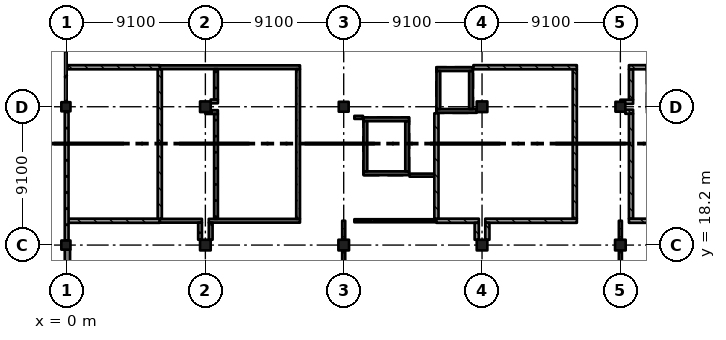
"""IFC4 building model, lengths in metres.
Left out: names, types, materials, properties, quantities, classifications, styles, units other than length and angle.
Written with IfcOpenShell. Run it as: python <this file> out.ifc"""

import sys

from ifc_helpers import new_model, si_unit, direction, frame, frame_2d, origin, origin_2d, place, context, subcontext, project, spatial, rectangle, extrude, element, fill, save


model = new_model("IFC4")
c1 = context("Model", 3, precision=1e-05, world=origin(), true_north=direction((0.0, 1.0)))
c2 = subcontext(c1, "Body", "Model", "MODEL_VIEW")
j1 = project(units=[si_unit("LENGTHUNIT", "METRE"), si_unit("PLANEANGLEUNIT", "RADIAN")], contexts=[c1])
p1 = place(None, origin())
s1 = spatial("IfcSite", under=j1, at=p1, CompositionType="ELEMENT")
p2 = place(p1, origin())
s2 = spatial("IfcBuilding", under=s1, at=p2, CompositionType="ELEMENT")
p3 = place(p2, frame((0.0, 0.0, 15.47)))
s3 = spatial("IfcBuildingStorey", under=s2, at=p3, CompositionType="ELEMENT", Elevation=15.47)
for number, where, z_axis, x_axis in (
    (1, (-0.075, 18.2, 0.0), (0.0, 0.0, 1.0), (1.0, 0.0, 0.0)),
    (2, (-0.075, 27.3, 0.0), (0.0, 0.0, 1.0), (1.0, 0.0, 0.0)),
):
    element("IfcColumn", number, at=place(p3, frame(where, z_axis=z_axis, x_axis=x_axis)), inside=s3, PredefinedType="COLUMN", context=c2, shape_type="SweptSolid", body=[
        extrude(rectangle(XDim=0.6, YDim=0.6, at=origin_2d()), origin(), (0.0, 0.0, 1.0), 4.55),
    ])
for number, where, z_axis, x_axis in (
    (3, (9.1, 18.2, 0.0), (0.0, 0.0, 1.0), (1.0, 0.0, 0.0)),
    (4, (9.1, 27.3, 0.0), (0.0, 0.0, 1.0), (1.0, 0.0, 0.0)),
    (5, (18.2, 18.2, 0.0), (0.0, 0.0, 1.0), (1.0, 0.0, 0.0)),
):
    element("IfcColumn", number, at=place(p3, frame(where, z_axis=z_axis, x_axis=x_axis)), inside=s3, PredefinedType="COLUMN", context=c2, shape_type="SweptSolid", body=[
        extrude(rectangle(XDim=0.7, YDim=0.7, at=origin_2d()), origin(), (0.0, 0.0, 1.0), 4.55),
    ])
p4 = place(p3, frame((18.2, 27.3, 0.0), z_axis=(0.0, 0.0, 1.0), x_axis=(1.0, 0.0, 0.0)))
e6 = element("IfcColumn", 6, at=p4, inside=s3, PredefinedType="COLUMN", context=c2, shape_type="SweptSolid", body=[
    extrude(rectangle(XDim=0.65, YDim=0.65, at=origin_2d()), origin(), (0.0, 0.0, 1.0), 4.55),
])
for number, where, z_axis, x_axis in (
    (7, (27.3, 18.2, 0.0), (0.0, 0.0, 1.0), (1.0, 0.0, 0.0)),
    (8, (27.3, 27.3, 0.0), (0.0, 0.0, 1.0), (1.0, 0.0, 0.0)),
    (9, (36.4, 18.2, 0.0), (0.0, 0.0, 1.0), (1.0, 0.0, 0.0)),
):
    element("IfcColumn", number, at=place(p3, frame(where, z_axis=z_axis, x_axis=x_axis)), inside=s3, PredefinedType="COLUMN", context=c2, shape_type="SweptSolid", body=[
        extrude(rectangle(XDim=0.7, YDim=0.7, at=origin_2d()), origin(), (0.0, 0.0, 1.0), 4.55),
    ])
p5 = place(p3, frame((36.4, 27.3, 0.0), z_axis=(0.0, 0.0, 1.0), x_axis=(1.0, 0.0, 0.0)))
e10 = element("IfcColumn", 10, at=p5, inside=s3, PredefinedType="COLUMN", context=c2, shape_type="SweptSolid", body=[
    extrude(rectangle(XDim=0.65, YDim=0.65, at=origin_2d()), origin(), (0.0, 0.0, 1.0), 4.55),
])
p6 = place(p3, frame((26.95, 27.025, 0.0), z_axis=(0.0, 0.0, 1.0), x_axis=(-1.0, 0.0, 0.0)))
e11 = element("IfcWall", 11, at=p6, inside=s3, PredefinedType="SHEAR", context=c2, shape_type="SweptSolid", body=[
    extrude(rectangle(XDim=2.65, YDim=0.25, at=frame_2d((1.325, 0.0))), origin(), (0.0, 0.0, 1.0), 4.55),
])
p7 = place(p3, frame((26.7, 29.775, 0.0), z_axis=(0.0, 0.0, 1.0), x_axis=(-1.0, 0.0, 0.0)))
e12 = element("IfcWall", 12, at=p7, inside=s3, PredefinedType="SHEAR", context=c2, shape_type="SweptSolid", body=[
    extrude(rectangle(XDim=2.4, YDim=0.25, at=frame_2d((1.2, 0.0))), origin(), (0.0, 0.0, 1.0), 4.55),
])
p8 = place(p3, frame((24.425, 29.65, 0.0), z_axis=(0.0, 0.0, 1.0), x_axis=(0.0, -1.0, 0.0)))
e13 = element("IfcWall", 13, at=p8, inside=s3, PredefinedType="SHEAR", context=c2, shape_type="SweptSolid", body=[
    extrude(rectangle(XDim=2.5, YDim=0.25, at=frame_2d((1.25, 0.0))), origin(), (0.0, 0.0, 1.0), 4.55),
])
p9 = place(p8, frame((0.9, 0.0, 0.0)))
e14 = element("IfcOpeningElement", 14, at=p9, cuts=e13, PredefinedType="OPENING", context=c2, shape_type="SweptSolid", body=[
    extrude(rectangle(XDim=0.7, YDim=2.1, at=frame_2d((0.35, 1.05))), frame((0.0, 0.135, 0.0), z_axis=(0.0, -1.0, 0.0), x_axis=(1.0, 0.0, 0.0)), (0.0, 0.0, 1.0), 0.27),
])
p10 = place(p3, frame((26.575, 29.65, 0.0), z_axis=(0.0, 0.0, 1.0), x_axis=(0.0, -1.0, 0.0)))
e15 = element("IfcWall", 15, at=p10, inside=s3, PredefinedType="SHEAR", context=c2, shape_type="SweptSolid", body=[
    extrude(rectangle(XDim=2.5, YDim=0.25, at=frame_2d((1.25, 0.0))), origin(), (0.0, 0.0, 1.0), 4.55),
])
p11 = place(p3, frame((22.5, 22.925, 0.0), z_axis=(0.0, 0.0, 1.0), x_axis=(-1.0, 0.0, 0.0)))
e16 = element("IfcWall", 16, at=p11, inside=s3, PredefinedType="SHEAR", context=c2, shape_type="SweptSolid", body=[
    extrude(rectangle(XDim=3.0, YDim=0.25, at=frame_2d((1.5, 0.0))), origin(), (0.0, 0.0, 1.0), 4.55),
])
p12 = place(p11, frame((0.95, 0.0, 0.0)))
e17 = element("IfcOpeningElement", 17, at=p12, cuts=e16, PredefinedType="OPENING", context=c2, shape_type="SweptSolid", body=[
    extrude(rectangle(XDim=1.1, YDim=2.1, at=frame_2d((0.55, 1.05))), frame((0.0, 0.135, 0.0), z_axis=(0.0, -1.0, 0.0), x_axis=(1.0, 0.0, 0.0)), (0.0, 0.0, 1.0), 0.27),
])
p13 = place(p3, frame((22.5, 26.475, 0.0), z_axis=(0.0, 0.0, 1.0), x_axis=(-1.0, 0.0, 0.0)))
e18 = element("IfcWall", 18, at=p13, inside=s3, PredefinedType="SHEAR", context=c2, shape_type="SweptSolid", body=[
    extrude(rectangle(XDim=3.0, YDim=0.25, at=frame_2d((1.5, 0.0))), origin(), (0.0, 0.0, 1.0), 4.55),
])
for number, where, z_axis, x_axis in (
    (19, (19.625, 26.35, 0.0), (0.0, 0.0, 1.0), (0.0, -1.0, 0.0)),
    (20, (22.375, 26.35, 0.0), (0.0, 0.0, 1.0), (0.0, -1.0, 0.0)),
):
    element("IfcWall", number, at=place(p3, frame(where, z_axis=z_axis, x_axis=x_axis)), inside=s3, PredefinedType="SHEAR", context=c2, shape_type="SweptSolid", body=[
        extrude(rectangle(XDim=3.3, YDim=0.25, at=frame_2d((1.65, 0.0))), origin(), (0.0, 0.0, 1.0), 4.55),
    ])
p14 = place(p3, frame((-0.025, 27.0, 0.0), z_axis=(0.0, 0.0, 1.0), x_axis=(0.0, -1.0, 0.0)))
e21 = element("IfcWall", 21, at=p14, inside=s3, PredefinedType="SOLIDWALL", context=c2, shape_type="SweptSolid", body=[
    extrude(rectangle(XDim=8.5, YDim=0.25, at=frame_2d((4.25, 0.0))), origin(), (0.0, 0.0, 1.0), 3.55),
])
p15 = place(p3, frame((0.025, 17.9, 0.0), z_axis=(0.0, 0.0, 1.0), x_axis=(0.0, -1.0, 0.0)))
e22 = element("IfcWall", 22, at=p15, inside=s3, PredefinedType="SOLIDWALL", context=c2, shape_type="SweptSolid", body=[
    extrude(rectangle(XDim=8.55, YDim=0.35, at=frame_2d((4.275, 0.0))), origin(), (0.0, 0.0, 1.0), 3.55),
])
p16 = place(p3, frame((0.03, 29.9, 0.0), z_axis=(0.0, 0.0, 1.0), x_axis=(1.0, 0.0, 0.0)))
e23 = element("IfcWall", 23, at=p16, inside=s3, PredefinedType="SOLIDWALL", context=c2, shape_type="SweptSolid", body=[
    extrude(rectangle(XDim=6.07, YDim=0.275, at=frame_2d((3.035, 0.0))), origin(), (0.0, 0.0, 1.0), 4.3),
])
p17 = place(p3, frame((0.1, 19.8, 0.0), z_axis=(0.0, 0.0, 1.0), x_axis=(1.0, 0.0, 0.0)))
e24 = element("IfcWall", 24, at=p17, inside=s3, PredefinedType="SOLIDWALL", context=c2, shape_type="SweptSolid", body=[
    extrude(rectangle(XDim=6.0, YDim=0.275, at=frame_2d((3.0, 0.0))), origin(), (0.0, 0.0, 1.0), 4.3),
])
p18 = place(p17, frame((2.65, 0.0, 0.0)))
e25 = element("IfcOpeningElement", 25, at=p18, cuts=e24, PredefinedType="OPENING", context=c2, shape_type="SweptSolid", body=[
    extrude(rectangle(XDim=1.2, YDim=2.4, at=frame_2d((0.6, 1.2))), frame((0.0, 0.147, 0.0), z_axis=(0.0, -1.0, 0.0), x_axis=(1.0, 0.0, 0.0)), (0.0, 0.0, 1.0), 0.295),
])
p19 = place(p3, frame((6.1, 19.8, 0.0), z_axis=(0.0, 0.0, 1.0), x_axis=(1.0, 0.0, 0.0)))
e26 = element("IfcWall", 26, at=p19, inside=s3, PredefinedType="SOLIDWALL", context=c2, shape_type="SweptSolid", body=[
    extrude(rectangle(XDim=2.775, YDim=0.25, at=frame_2d((1.387, 0.0))), origin(), (0.0, 0.0, 1.0), 4.3),
])
p20 = place(p19, frame((0.95, 0.0, 0.0)))
e27 = element("IfcOpeningElement", 27, at=p20, cuts=e26, PredefinedType="OPENING", context=c2, shape_type="SweptSolid", body=[
    extrude(rectangle(XDim=0.8, YDim=2.1, at=frame_2d((0.4, 1.05))), frame((0.0, 0.135, 0.0), z_axis=(0.0, -1.0, 0.0), x_axis=(1.0, 0.0, 0.0)), (0.0, 0.0, 1.0), 0.27),
])
p21 = place(p3, frame((6.1, 29.762, 0.0), z_axis=(0.0, 0.0, 1.0), x_axis=(0.0, -1.0, 0.0)))
e28 = element("IfcWall", 28, at=p21, inside=s3, PredefinedType="SOLIDWALL", context=c2, shape_type="SweptSolid", body=[
    extrude(rectangle(XDim=9.825, YDim=0.275, at=frame_2d((4.913, 0.0))), origin(), (0.0, 0.0, 1.0), 4.3),
])
p22 = place(p3, frame((6.1, 29.9, 0.0), z_axis=(0.0, 0.0, 1.0), x_axis=(1.0, 0.0, 0.0)))
e29 = element("IfcWall", 29, at=p22, inside=s3, PredefinedType="SOLIDWALL", context=c2, shape_type="SweptSolid", body=[
    extrude(rectangle(XDim=9.225, YDim=0.25, at=frame_2d((4.612, 0.0))), origin(), (0.0, 0.0, 1.0), 4.3),
])
p23 = place(p3, frame((8.75, 19.675, 0.0), z_axis=(0.0, 0.0, 1.0), x_axis=(0.0, -1.0, 0.0)))
e30 = element("IfcWall", 30, at=p23, inside=s3, PredefinedType="SOLIDWALL", context=c2, shape_type="SweptSolid", body=[
    extrude(rectangle(XDim=1.125, YDim=0.25, at=frame_2d((0.562, 0.0))), origin(), (0.0, 0.0, 1.0), 4.3),
])
p24 = place(p3, frame((9.1, 26.95, 0.0), z_axis=(0.0, 0.0, 1.0), x_axis=(1.0, 0.0, 0.0)))
e31 = element("IfcWall", 31, at=p24, inside=s3, PredefinedType="SOLIDWALL", context=c2, shape_type="SweptSolid", body=[
    extrude(rectangle(XDim=0.825, YDim=0.25, at=frame_2d((0.413, 0.0))), origin(), (0.0, 0.0, 1.0), 4.3),
])
p25 = place(p3, frame((9.325, 19.8, 0.0), z_axis=(0.0, 0.0, 1.0), x_axis=(1.0, 0.0, 0.0)))
e32 = element("IfcWall", 32, at=p25, inside=s3, PredefinedType="SOLIDWALL", context=c2, shape_type="SweptSolid", body=[
    extrude(rectangle(XDim=6.0, YDim=0.25, at=frame_2d((3.0, 0.0))), origin(), (0.0, 0.0, 1.0), 4.3),
])
p26 = place(p25, frame((2.825, 0.0, 0.0)))
e33 = element("IfcOpeningElement", 33, at=p26, cuts=e32, PredefinedType="OPENING", context=c2, shape_type="SweptSolid", body=[
    extrude(rectangle(XDim=0.8, YDim=2.1, at=frame_2d((0.4, 1.05))), frame((0.0, 0.135, 0.0), z_axis=(0.0, -1.0, 0.0), x_axis=(1.0, 0.0, 0.0)), (0.0, 0.0, 1.0), 0.27),
])
p27 = place(p3, frame((9.45, 18.55, 0.0), z_axis=(0.0, 0.0, 1.0), x_axis=(0.0, 1.0, 0.0)))
e34 = element("IfcWall", 34, at=p27, inside=s3, PredefinedType="SOLIDWALL", context=c2, shape_type="SweptSolid", body=[
    extrude(rectangle(XDim=1.125, YDim=0.25, at=frame_2d((0.562, 0.0))), origin(), (0.0, 0.0, 1.0), 4.3),
])
p28 = place(p3, frame((9.45, 27.65, 0.0), z_axis=(0.0, 0.0, 1.0), x_axis=(1.0, 0.0, 0.0)))
e35 = element("IfcWall", 35, at=p28, inside=s3, PredefinedType="SOLIDWALL", context=c2, shape_type="SweptSolid", body=[
    extrude(rectangle(XDim=0.475, YDim=0.25, at=frame_2d((0.238, 0.0))), origin(), (0.0, 0.0, 1.0), 4.3),
])
p29 = place(p3, frame((9.8, 19.925, 0.0), z_axis=(0.0, 0.0, 1.0), x_axis=(0.0, 1.0, 0.0)))
e36 = element("IfcWall", 36, at=p29, inside=s3, PredefinedType="SOLIDWALL", context=c2, shape_type="SweptSolid", body=[
    extrude(rectangle(XDim=6.9, YDim=0.25, at=frame_2d((3.45, 0.0))), origin(), (0.0, 0.0, 1.0), 4.3),
])
p30 = place(p3, frame((9.8, 27.775, 0.0), z_axis=(0.0, 0.0, 1.0), x_axis=(0.0, 1.0, 0.0)))
e37 = element("IfcWall", 37, at=p30, inside=s3, PredefinedType="SOLIDWALL", context=c2, shape_type="SweptSolid", body=[
    extrude(rectangle(XDim=2.0, YDim=0.25, at=frame_2d((1.0, 0.0))), origin(), (0.0, 0.0, 1.0), 4.3),
])
p31 = place(p3, frame((15.2, 29.775, 0.0), z_axis=(0.0, 0.0, 1.0), x_axis=(0.0, -1.0, 0.0)))
e38 = element("IfcWall", 38, at=p31, inside=s3, PredefinedType="SOLIDWALL", context=c2, shape_type="SweptSolid", body=[
    extrude(rectangle(XDim=9.85, YDim=0.25, at=frame_2d((4.925, 0.0))), origin(), (0.0, 0.0, 1.0), 4.3),
])
p32 = place(p3, frame((18.2, 17.85, 0.0), z_axis=(0.0, 0.0, 1.0), x_axis=(0.0, -1.0, 0.0)))
e39 = element("IfcWall", 39, at=p32, inside=s3, PredefinedType="PARTITIONING", context=c2, shape_type="SweptSolid", body=[
    extrude(rectangle(XDim=6.913, YDim=0.2, at=frame_2d((3.456, 0.0))), origin(), (0.0, 0.0, 1.0), 3.55),
])
p33 = place(p32, frame((0.85, 0.0, 0.0)))
e40 = element("IfcOpeningElement", 40, at=p33, cuts=e39, PredefinedType="OPENING", context=c2, shape_type="SweptSolid", body=[
    extrude(rectangle(XDim=1.8, YDim=2.4, at=frame_2d((0.9, 1.2))), frame((0.0, 0.11, 0.0), z_axis=(0.0, -1.0, 0.0), x_axis=(1.0, 0.0, 0.0)), (0.0, 0.0, 1.0), 0.22),
])
p34 = place(p32, frame((4.25, 0.0, 0.0)))
e41 = element("IfcOpeningElement", 41, at=p34, cuts=e39, PredefinedType="OPENING", context=c2, shape_type="SweptSolid", body=[
    extrude(rectangle(XDim=1.8, YDim=2.4, at=frame_2d((0.9, 1.2))), frame((0.0, 0.11, 0.0), z_axis=(0.0, -1.0, 0.0), x_axis=(1.0, 0.0, 0.0)), (0.0, 0.0, 1.0), 0.22),
])
p35 = place(p3, frame((18.2, 19.8, 0.0), z_axis=(0.0, 0.0, 1.0), x_axis=(0.0, -1.0, 0.0)))
e42 = element("IfcWall", 42, at=p35, inside=s3, PredefinedType="PARTITIONING", context=c2, shape_type="SweptSolid", body=[
    extrude(rectangle(XDim=1.25, YDim=0.2, at=frame_2d((0.625, 0.0))), origin(), (0.0, 0.0, 1.0), 3.55),
])
p36 = place(p3, frame((18.9, 19.8, 0.0), z_axis=(0.0, 0.0, 1.0), x_axis=(1.0, 0.0, 0.0)))
e43 = element("IfcWall", 43, at=p36, inside=s3, PredefinedType="PARTITIONING", context=c2, shape_type="SweptSolid", body=[
    extrude(rectangle(XDim=5.4, YDim=0.2, at=frame_2d((2.7, 0.0))), origin(), (0.0, 0.0, 1.0), 4.3),
])
p37 = place(p36, frame((1.85, 0.0, 0.0)))
e44 = element("IfcOpeningElement", 44, at=p37, cuts=e43, PredefinedType="OPENING", context=c2, shape_type="SweptSolid", body=[
    extrude(rectangle(XDim=1.8, YDim=2.4, at=frame_2d((0.9, 1.2))), frame((0.0, 0.11, 0.0), z_axis=(0.0, -1.0, 0.0), x_axis=(1.0, 0.0, 0.0)), (0.0, 0.0, 1.0), 0.22),
])
p38 = place(p3, frame((18.9, 26.6, 0.0), z_axis=(0.0, 0.0, 1.0), x_axis=(1.0, 0.0, 0.0)))
e45 = element("IfcWall", 45, at=p38, inside=s3, PredefinedType="PARTITIONING", context=c2, shape_type="SweptSolid", body=[
    extrude(rectangle(XDim=0.57, YDim=0.2, at=frame_2d((0.285, 0.0))), origin(), (0.0, 0.0, 1.0), 4.3),
])
p39 = place(p3, frame((22.53, 22.8, 0.0), z_axis=(0.0, 0.0, 1.0), x_axis=(1.0, 0.0, 0.0)))
e46 = element("IfcWall", 46, at=p39, inside=s3, PredefinedType="PARTITIONING", context=c2, shape_type="SweptSolid", body=[
    extrude(rectangle(XDim=1.633, YDim=0.2, at=frame_2d((0.816, 0.0))), origin(), (0.0, 0.0, 1.0), 4.3),
])
p40 = place(p3, frame((24.3, 19.8, 0.0), z_axis=(0.0, 0.0, 1.0), x_axis=(1.0, 0.0, 0.0)))
e47 = element("IfcWall", 47, at=p40, inside=s3, PredefinedType="SOLIDWALL", context=c2, shape_type="SweptSolid", body=[
    extrude(rectangle(XDim=2.787, YDim=0.275, at=frame_2d((1.394, 0.0))), origin(), (0.0, 0.0, 1.0), 4.3),
])
p41 = place(p3, frame((24.3, 19.938, 0.0), z_axis=(0.0, 0.0, 1.0), x_axis=(0.0, 1.0, 0.0)))
e48 = element("IfcWall", 48, at=p41, inside=s3, PredefinedType="SOLIDWALL", context=c2, shape_type="SweptSolid", body=[
    extrude(rectangle(XDim=6.933, YDim=0.275, at=frame_2d((3.466, 0.0))), origin(), (0.0, 0.0, 1.0), 4.3),
])
p42 = place(p3, frame((26.73, 29.9, 0.0), z_axis=(0.0, 0.0, 1.0), x_axis=(1.0, 0.0, 0.0)))
e49 = element("IfcWall", 49, at=p42, inside=s3, PredefinedType="SOLIDWALL", context=c2, shape_type="SweptSolid", body=[
    extrude(rectangle(XDim=6.808, YDim=0.275, at=frame_2d((3.404, 0.0))), origin(), (0.0, 0.0, 1.0), 4.3),
])
p43 = place(p3, frame((26.95, 19.663, 0.0), z_axis=(0.0, 0.0, 1.0), x_axis=(0.0, -1.0, 0.0)))
e50 = element("IfcWall", 50, at=p43, inside=s3, PredefinedType="SOLIDWALL", context=c2, shape_type="SweptSolid", body=[
    extrude(rectangle(XDim=1.113, YDim=0.275, at=frame_2d((0.556, 0.0))), origin(), (0.0, 0.0, 1.0), 4.3),
])
p44 = place(p3, frame((27.512, 19.8, 0.0), z_axis=(0.0, 0.0, 1.0), x_axis=(1.0, 0.0, 0.0)))
e51 = element("IfcWall", 51, at=p44, inside=s3, PredefinedType="SOLIDWALL", context=c2, shape_type="SweptSolid", body=[
    extrude(rectangle(XDim=6.025, YDim=0.275, at=frame_2d((3.013, 0.0))), origin(), (0.0, 0.0, 1.0), 4.3),
])
p45 = place(p44, frame((2.45, 0.0, 0.0)))
e52 = element("IfcOpeningElement", 52, at=p45, cuts=e51, PredefinedType="OPENING", context=c2, shape_type="SweptSolid", body=[
    extrude(rectangle(XDim=1.2, YDim=2.4, at=frame_2d((0.6, 1.2))), frame((0.0, 0.147, 0.0), z_axis=(0.0, -1.0, 0.0), x_axis=(1.0, 0.0, 0.0)), (0.0, 0.0, 1.0), 0.295),
])
p46 = place(p3, frame((27.65, 18.55, 0.0), z_axis=(0.0, 0.0, 1.0), x_axis=(0.0, 1.0, 0.0)))
e53 = element("IfcWall", 53, at=p46, inside=s3, PredefinedType="SOLIDWALL", context=c2, shape_type="SweptSolid", body=[
    extrude(rectangle(XDim=1.113, YDim=0.275, at=frame_2d((0.556, 0.0))), origin(), (0.0, 0.0, 1.0), 4.3),
])
p47 = place(p3, frame((33.4, 29.762, 0.0), z_axis=(0.0, 0.0, 1.0), x_axis=(0.0, -1.0, 0.0)))
e54 = element("IfcWall", 54, at=p47, inside=s3, PredefinedType="SOLIDWALL", context=c2, shape_type="SweptSolid", body=[
    extrude(rectangle(XDim=9.825, YDim=0.275, at=frame_2d((4.913, 0.0))), origin(), (0.0, 0.0, 1.0), 4.3),
])
p48 = place(p3, frame((36.4, 17.85, 0.0), z_axis=(0.0, 0.0, 1.0), x_axis=(0.0, -1.0, 0.0)))
e55 = element("IfcWall", 55, at=p48, inside=s3, PredefinedType="PARTITIONING", context=c2, shape_type="SweptSolid", body=[
    extrude(rectangle(XDim=6.95, YDim=0.2, at=frame_2d((3.475, 0.0))), origin(), (0.0, 0.0, 1.0), 3.6),
])
p49 = place(p48, frame((0.85, 0.0, 0.0)))
e56 = element("IfcOpeningElement", 56, at=p49, cuts=e55, PredefinedType="OPENING", context=c2, shape_type="SweptSolid", body=[
    extrude(rectangle(XDim=1.8, YDim=2.4, at=frame_2d((0.9, 1.2))), frame((0.0, 0.11, 0.0), z_axis=(0.0, -1.0, 0.0), x_axis=(1.0, 0.0, 0.0)), (0.0, 0.0, 1.0), 0.22),
])
p50 = place(p48, frame((4.35, 0.0, 0.0)))
e57 = element("IfcOpeningElement", 57, at=p50, cuts=e55, PredefinedType="OPENING", context=c2, shape_type="SweptSolid", body=[
    extrude(rectangle(XDim=1.8, YDim=2.4, at=frame_2d((0.9, 1.2))), frame((0.0, 0.11, 0.0), z_axis=(0.0, -1.0, 0.0), x_axis=(1.0, 0.0, 0.0)), (0.0, 0.0, 1.0), 0.22),
])
p51 = place(p3, frame((36.4, 19.8, 0.0), z_axis=(0.0, 0.0, 1.0), x_axis=(0.0, -1.0, 0.0)))
e58 = element("IfcWall", 58, at=p51, inside=s3, PredefinedType="PARTITIONING", context=c2, shape_type="SweptSolid", body=[
    extrude(rectangle(XDim=1.25, YDim=0.2, at=frame_2d((0.625, 0.0))), origin(), (0.0, 0.0, 1.0), 3.55),
])
p52 = place(p3, frame((36.4, 27.625, 0.0), z_axis=(0.0, 0.0, 1.0), x_axis=(1.0, 0.0, 0.0)))
e59 = element("IfcWall", 59, at=p52, inside=s3, PredefinedType="SOLIDWALL", context=c2, shape_type="SweptSolid", body=[
    extrude(rectangle(XDim=0.838, YDim=0.275, at=frame_2d((0.419, 0.0))), origin(), (0.0, 0.0, 1.0), 4.3),
])
p53 = place(p3, frame((36.725, 26.975, 0.0), z_axis=(0.0, 0.0, 1.0), x_axis=(1.0, 0.0, 0.0)))
e60 = element("IfcWall", 60, at=p53, inside=s3, PredefinedType="SOLIDWALL", context=c2, shape_type="SweptSolid", body=[
    extrude(rectangle(XDim=0.512, YDim=0.275, at=frame_2d((0.256, 0.0))), origin(), (0.0, 0.0, 1.0), 4.3),
])
p54 = place(p3, frame((36.962, 19.8, 0.0), z_axis=(0.0, 0.0, 1.0), x_axis=(1.0, 0.0, 0.0)))
e61 = element("IfcWall", 61, at=p54, inside=s3, PredefinedType="SOLIDWALL", context=c2, shape_type="SweptSolid", body=[
    extrude(rectangle(XDim=3.688, YDim=0.275, at=frame_2d((1.844, 0.0))), origin(), (0.0, 0.0, 1.0), 4.3),
])
p55 = place(p54, frame((1.25, 0.0, 0.0)))
e62 = element("IfcOpeningElement", 62, at=p55, cuts=e61, PredefinedType="OPENING", context=c2, shape_type="SweptSolid", body=[
    extrude(rectangle(XDim=1.2, YDim=2.4, at=frame_2d((0.6, 1.2))), frame((0.0, 0.147, 0.0), z_axis=(0.0, -1.0, 0.0), x_axis=(1.0, 0.0, 0.0)), (0.0, 0.0, 1.0), 0.295),
])
p56 = place(p3, frame((36.962, 29.9, 0.0), z_axis=(0.0, 0.0, 1.0), x_axis=(1.0, 0.0, 0.0)))
e63 = element("IfcWall", 63, at=p56, inside=s3, PredefinedType="SOLIDWALL", context=c2, shape_type="SweptSolid", body=[
    extrude(rectangle(XDim=1.158, YDim=0.275, at=frame_2d((0.579, 0.0))), origin(), (0.0, 0.0, 1.0), 4.3),
])
p57 = place(p3, frame((37.1, 26.837, 0.0), z_axis=(0.0, 0.0, 1.0), x_axis=(0.0, -1.0, 0.0)))
e64 = element("IfcWall", 64, at=p57, inside=s3, PredefinedType="SOLIDWALL", context=c2, shape_type="SweptSolid", body=[
    extrude(rectangle(XDim=6.9, YDim=0.275, at=frame_2d((3.45, 0.0))), origin(), (0.0, 0.0, 1.0), 4.3),
])
p58 = place(p3, frame((37.1, 29.762, 0.0), z_axis=(0.0, 0.0, 1.0), x_axis=(0.0, -1.0, 0.0)))
e65 = element("IfcWall", 65, at=p58, inside=s3, PredefinedType="SOLIDWALL", context=c2, shape_type="SweptSolid", body=[
    extrude(rectangle(XDim=2.0, YDim=0.275, at=frame_2d((1.0, 0.0))), origin(), (0.0, 0.0, 1.0), 4.3),
])
p59 = place(p20, origin())
e66 = element("IfcDoor", 66, at=p59, inside=s3, OperationType="SINGLE_SWING_RIGHT", PredefinedType="DOOR", context=c2, shape_type="SweptSolid", body=[
    extrude(rectangle(XDim=0.8, YDim=2.1, at=frame_2d((0.4, 1.05))), frame((0.0, 0.025, 0.0), z_axis=(0.0, -1.0, 0.0), x_axis=(1.0, 0.0, 0.0)), (0.0, 0.0, 1.0), 0.05),
])
fill(e27, e66)
p60 = place(p45, origin())
e67 = element("IfcDoor", 67, at=p60, inside=s3, OperationType="SINGLE_SWING_LEFT", PredefinedType="DOOR", context=c2, shape_type="SweptSolid", body=[
    extrude(rectangle(XDim=1.2, YDim=2.4, at=frame_2d((0.6, 1.2))), frame((0.0, 0.025, 0.0), z_axis=(0.0, -1.0, 0.0), x_axis=(1.0, 0.0, 0.0)), (0.0, 0.0, 1.0), 0.05),
])
fill(e52, e67)
p61 = place(p18, origin())
e68 = element("IfcDoor", 68, at=p61, inside=s3, OperationType="SINGLE_SWING_RIGHT", PredefinedType="DOOR", context=c2, shape_type="SweptSolid", body=[
    extrude(rectangle(XDim=1.2, YDim=2.4, at=frame_2d((0.6, 1.2))), frame((0.0, 0.025, 0.0), z_axis=(0.0, -1.0, 0.0), x_axis=(1.0, 0.0, 0.0)), (0.0, 0.0, 1.0), 0.05),
])
fill(e25, e68)
p62 = place(p26, origin())
e69 = element("IfcDoor", 69, at=p62, inside=s3, OperationType="SINGLE_SWING_RIGHT", PredefinedType="DOOR", context=c2, shape_type="SweptSolid", body=[
    extrude(rectangle(XDim=0.8, YDim=2.1, at=frame_2d((0.4, 1.05))), frame((0.0, 0.025, 0.0), z_axis=(0.0, -1.0, 0.0), x_axis=(1.0, 0.0, 0.0)), (0.0, 0.0, 1.0), 0.05),
])
fill(e33, e69)
p63 = place(p37, origin())
e70 = element("IfcDoor", 70, at=p63, inside=s3, OperationType="DOUBLE_DOOR_SINGLE_SWING", PredefinedType="DOOR", context=c2, shape_type="SweptSolid", body=[
    extrude(rectangle(XDim=1.8, YDim=2.4, at=frame_2d((0.9, 1.2))), frame((0.0, 0.025, 0.0), z_axis=(0.0, -1.0, 0.0), x_axis=(1.0, 0.0, 0.0)), (0.0, 0.0, 1.0), 0.05),
])
fill(e44, e70)
p64 = place(p9, origin())
e71 = element("IfcDoor", 71, at=p64, inside=s3, OperationType="SINGLE_SWING_LEFT", PredefinedType="DOOR", context=c2, shape_type="SweptSolid", body=[
    extrude(rectangle(XDim=0.7, YDim=2.1, at=frame_2d((0.35, 1.05))), frame((0.0, 0.025, 0.0), z_axis=(0.0, -1.0, 0.0), x_axis=(1.0, 0.0, 0.0)), (0.0, 0.0, 1.0), 0.05),
])
fill(e14, e71)
p65 = place(p12, origin())
e72 = element("IfcDoor", 72, at=p65, inside=s3, OperationType="DOUBLE_DOOR_SLIDING", PredefinedType="DOOR", context=c2, shape_type="SweptSolid", body=[
    extrude(rectangle(XDim=1.1, YDim=2.1, at=frame_2d((0.55, 1.05))), frame((0.0, 0.025, 0.0), z_axis=(0.0, -1.0, 0.0), x_axis=(1.0, 0.0, 0.0)), (0.0, 0.0, 1.0), 0.05),
])
fill(e17, e72)
save(model, sys.argv[1])
